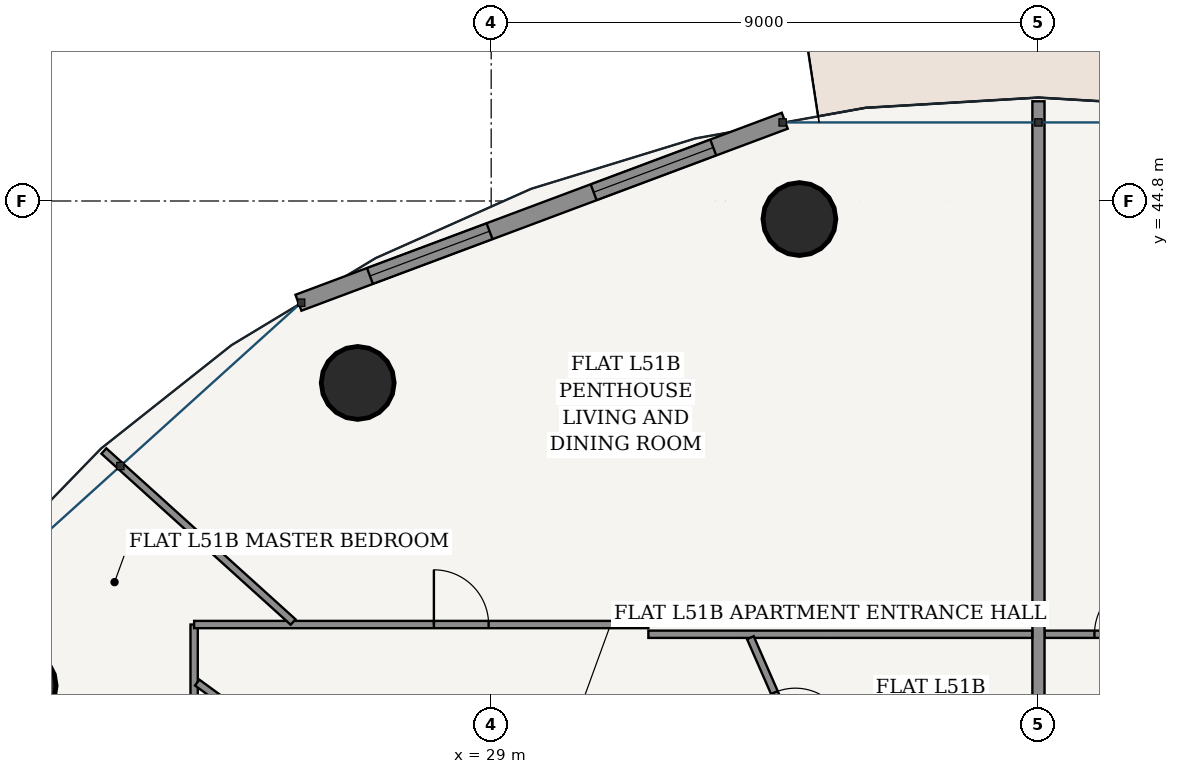
"""IFC4 building model, lengths in metres.
Left out: names, types, materials, properties, quantities, classifications, styles, units other than length and angle.
Written with IfcOpenShell. Run it as: python <this file> out.ifc"""

import sys

from ifc_helpers import new_model, si_unit, direction, frame, frame_2d, origin, origin_2d, place, context, subcontext, project, spatial, rectangle, hollow_circle, extrude, source, transform, mapped, element, fill, save


model = new_model("IFC4")
c1 = context("Model", 3, precision=1e-05, world=origin(), true_north=direction((-0.2419218956, 0.970295726276)))
c2 = subcontext(c1, "Body", "Model", "MODEL_VIEW")
j1 = project(units=[si_unit("LENGTHUNIT", "METRE"), si_unit("PLANEANGLEUNIT", "RADIAN")], contexts=[c1])
p1 = place(None, origin())
s1 = spatial("IfcSite", under=j1, at=p1, CompositionType="ELEMENT")
p2 = place(p1, origin())
s2 = spatial("IfcBuilding", under=s1, at=p2, CompositionType="ELEMENT")
p3 = place(p2, frame((0.0, 0.0, 194.9)))
s3 = spatial("IfcBuildingStorey", under=s2, at=p3, CompositionType="ELEMENT", Elevation=194.9)
for number, where, z_axis, x_axis in (
    (1, (34.069, 44.503, 0.0), (0.0, 0.0, 1.0), (1.0, 0.0, 0.0)),
    (2, (26.805, 41.808, 0.0), (0.0, 0.0, 1.0), (1.0, 0.0, 0.0)),
    (3, (21.246, 36.828, 0.0), (0.0, 0.0, 1.0), (1.0, 0.0, 0.0)),
):
    element("IfcColumn", number, at=place(p3, frame(where, z_axis=z_axis, x_axis=x_axis)), inside=s3, PredefinedType="COLUMN", context=c2, shape_type="SweptSolid", body=[
        extrude(hollow_circle(Radius=0.6, WallThickness=0.038, at=origin_2d()), origin(), (0.0, 0.0, 1.0), 3.7),
    ])
p4 = place(p3, frame((33.828, 46.12, 0.0), z_axis=(0.0, 0.0, 1.0), x_axis=(-0.936556918375, -0.350515532672, 0.0)))
e4 = element("IfcWall", 4, at=p4, inside=s3, PredefinedType="SOLIDWALL", context=c2, shape_type="SweptSolid", body=[
    extrude(rectangle(XDim=8.539, YDim=0.28, at=frame_2d((4.27, 0.0))), origin(), (0.0, 0.0, 1.0), 3.435),
])
p5 = place(p4, frame((1.256, 0.0, 0.85)))
e5 = element("IfcOpeningElement", 5, at=p5, cuts=e4, PredefinedType="OPENING", context=c2, shape_type="SweptSolid", body=[
    extrude(rectangle(XDim=2.1, YDim=1.95, at=frame_2d((1.05, 0.975))), frame((0.0, 0.15, 0.0), z_axis=(0.0, -1.0, 0.0), x_axis=(1.0, 0.0, 0.0)), (0.0, 0.0, 1.0), 0.3),
])
p6 = place(p4, frame((5.184, 0.0, 0.85)))
e6 = element("IfcOpeningElement", 6, at=p6, cuts=e4, PredefinedType="OPENING", context=c2, shape_type="SweptSolid", body=[
    extrude(rectangle(XDim=2.1, YDim=1.95, at=frame_2d((1.05, 0.975))), frame((0.0, 0.15, 0.0), z_axis=(0.0, -1.0, 0.0), x_axis=(1.0, 0.0, 0.0)), (0.0, 0.0, 1.0), 0.3),
])
p7 = place(p3, frame((38.102, 37.675, 0.0), z_axis=(0.0, 0.0, 1.0), x_axis=(1.0, 0.0, 0.0)))
e7 = element("IfcWall", 7, at=p7, inside=s3, PredefinedType="PARTITIONING", context=c2, shape_type="SweptSolid", body=[
    extrude(rectangle(XDim=6.313, YDim=0.12, at=frame_2d((3.156, 0.0))), origin(), (0.0, 0.0, 1.0), 2.951),
])
p8 = place(p7, frame((0.819, 0.0, 0.0)))
e8 = element("IfcOpeningElement", 8, at=p8, cuts=e7, PredefinedType="OPENING", context=c2, shape_type="SweptSolid", body=[
    extrude(rectangle(XDim=0.9, YDim=2.15, at=frame_2d((0.45, 1.075))), frame((0.0, 0.07, 0.0), z_axis=(0.0, -1.0, 0.0), x_axis=(1.0, 0.0, 0.0)), (0.0, 0.0, 1.0), 0.14),
])
p9 = place(p3, frame((38.0, 35.027, 0.0), z_axis=(0.0, 0.0, 1.0), x_axis=(0.0, 1.0, 0.0)))
e9 = element("IfcWall", 9, at=p9, inside=s3, PredefinedType="PARTITIONING", context=c2, shape_type="SweptSolid", body=[
    extrude(rectangle(XDim=11.413, YDim=0.2, at=frame_2d((5.707, 0.0))), origin(), (0.0, 0.0, 1.0), 2.52),
])
p10 = place(p3, frame((24.115, 24.406, 0.0), z_axis=(0.0, 0.0, 1.0), x_axis=(0.0, 1.0, 0.0)))
e10 = element("IfcWall", 10, at=p10, inside=s3, PredefinedType="PARTITIONING", context=c2, shape_type="SweptSolid", body=[
    extrude(rectangle(XDim=13.429, YDim=0.12, at=frame_2d((6.714, 0.0))), origin(), (0.0, 0.0, 1.0), 2.951),
])
p11 = place(p10, frame((9.641, 0.0, 0.0)))
e11 = element("IfcOpeningElement", 11, at=p11, cuts=e10, PredefinedType="OPENING", context=c2, shape_type="SweptSolid", body=[
    extrude(rectangle(XDim=0.9, YDim=2.15, at=frame_2d((0.45, 1.075))), frame((0.0, 0.07, 0.0), z_axis=(0.0, -1.0, 0.0), x_axis=(1.0, 0.0, 0.0)), (0.0, 0.0, 1.0), 0.14),
])
p12 = place(p3, frame((24.115, 37.835, 0.0), z_axis=(0.0, 0.0, 1.0), x_axis=(1.0, 0.0, 0.0)))
e12 = element("IfcWall", 12, at=p12, inside=s3, PredefinedType="PARTITIONING", context=c2, shape_type="SweptSolid", body=[
    extrude(rectangle(XDim=7.47, YDim=0.12, at=frame_2d((3.735, 0.0))), origin(), (0.0, 0.0, 1.0), 2.951),
])
p13 = place(p12, frame((3.943, 0.0, 0.0)))
e13 = element("IfcOpeningElement", 13, at=p13, cuts=e12, PredefinedType="OPENING", context=c2, shape_type="SweptSolid", body=[
    extrude(rectangle(XDim=0.9, YDim=2.15, at=frame_2d((0.45, 1.075))), frame((0.0, 0.07, 0.0), z_axis=(0.0, -1.0, 0.0), x_axis=(1.0, 0.0, 0.0)), (0.0, 0.0, 1.0), 0.14),
])
p14 = place(p3, frame((31.585, 37.675, 0.0), z_axis=(0.0, 0.0, 1.0), x_axis=(1.0, 0.0, 0.0)))
e14 = element("IfcWall", 14, at=p14, inside=s3, PredefinedType="PARTITIONING", context=c2, shape_type="SweptSolid", body=[
    extrude(rectangle(XDim=6.313, YDim=0.12, at=frame_2d((3.156, 0.0))), origin(), (0.0, 0.0, 1.0), 2.951),
])
p15 = place(p3, frame((25.743, 37.876, 0.0), z_axis=(0.0, 0.0, 1.0), x_axis=(-0.741943837234, 0.670462036502, 0.0)))
e15 = element("IfcWall", 15, at=p15, inside=s3, PredefinedType="PARTITIONING", context=c2, shape_type="SweptSolid", body=[
    extrude(rectangle(XDim=4.194, YDim=0.12, at=frame_2d((2.097, 0.0))), origin(), (0.0, 0.0, 1.0), 2.951),
])
p16 = place(p3, frame((34.397, 35.027, 0.0), z_axis=(0.0, 0.0, 1.0), x_axis=(-0.401135725485, 0.916018629581, 0.0)))
e16 = element("IfcWall", 16, at=p16, inside=s3, PredefinedType="PARTITIONING", context=c2, shape_type="SweptSolid", body=[
    extrude(rectangle(XDim=2.829, YDim=0.12, at=frame_2d((1.415, 0.0))), origin(), (0.0, 0.0, 1.0), 3.435),
])
p17 = place(p16, frame((0.985, 0.0, 0.0)))
e17 = element("IfcOpeningElement", 17, at=p17, cuts=e16, PredefinedType="OPENING", context=c2, shape_type="SweptSolid", body=[
    extrude(rectangle(XDim=0.86, YDim=2.15, at=frame_2d((0.43, 1.075))), frame((0.0, 0.07, 0.0), z_axis=(0.0, -1.0, 0.0), x_axis=(1.0, 0.0, 0.0)), (0.0, 0.0, 1.0), 0.14),
])
p18 = place(p3, frame((26.765, 34.986, 0.0), z_axis=(0.0, 0.0, 1.0), x_axis=(-0.808220499107, 0.588879974887, 0.0)))
e18 = element("IfcWall", 18, at=p18, inside=s3, PredefinedType="PARTITIONING", context=c2, shape_type="SweptSolid", body=[
    extrude(rectangle(XDim=3.217, YDim=0.12, at=frame_2d((1.608, 0.0))), origin(), (0.0, 0.0, 1.0), 3.11),
])
p19 = place(p18, frame((1.158, 0.0, 0.0)))
e19 = element("IfcOpeningElement", 19, at=p19, cuts=e18, PredefinedType="OPENING", context=c2, shape_type="SweptSolid", body=[
    extrude(rectangle(XDim=0.9, YDim=2.15, at=frame_2d((0.45, 1.075))), frame((0.0, 0.07, 0.0), z_axis=(0.0, -1.0, 0.0), x_axis=(1.0, 0.0, 0.0)), (0.0, 0.0, 1.0), 0.14),
])
m1 = source(origin(), c2, "Body", "SweptSolid", [
    extrude(rectangle(XDim=2.1, YDim=1.95, at=frame_2d((1.05, 0.975))), frame((0.0, 0.03, 0.0), z_axis=(0.0, -1.0, 0.0), x_axis=(1.0, 0.0, 0.0)), (0.0, 0.0, 1.0), 0.06),
])
p20 = place(p5, origin())
e20 = element("IfcWindow", 20, at=p20, inside=s3, PartitioningType="SINGLE_PANEL", PredefinedType="WINDOW", context=c2, shape_type="MappedRepresentation", body=[
    mapped(m1, transform((0.0, 0.0, 0.0), scale=1.0)),
])
fill(e5, e20)
p21 = place(p6, origin())
e21 = element("IfcWindow", 21, at=p21, inside=s3, PartitioningType="SINGLE_PANEL", PredefinedType="WINDOW", context=c2, shape_type="MappedRepresentation", body=[
    mapped(m1, transform((0.0, 0.0, 0.0), scale=1.0)),
])
fill(e6, e21)
m2 = source(origin(), c2, "Body", "SweptSolid", [
    extrude(rectangle(XDim=0.9, YDim=2.15, at=frame_2d((0.45, 1.075))), frame((0.0, 0.025, 0.0), z_axis=(0.0, -1.0, 0.0), x_axis=(1.0, 0.0, 0.0)), (0.0, 0.0, 1.0), 0.05),
])
p22 = place(p8, origin())
e22 = element("IfcDoor", 22, at=p22, inside=s3, OperationType="SINGLE_SWING_RIGHT", PredefinedType="DOOR", context=c2, shape_type="MappedRepresentation", body=[
    mapped(m2, transform((0.0, 0.0, 0.0), scale=1.0)),
])
fill(e8, e22)
m3 = source(origin(), c2, "Body", "SweptSolid", [
    extrude(rectangle(XDim=0.86, YDim=2.15, at=frame_2d((0.43, 1.075))), frame((0.0, 0.025, 0.0), z_axis=(0.0, -1.0, 0.0), x_axis=(1.0, 0.0, 0.0)), (0.0, 0.0, 1.0), 0.05),
])
p23 = place(p17, frame((0.86, 0.0, 0.0), z_axis=(0.0, 0.0, 1.0), x_axis=(-1.0, 0.0, 0.0)))
e23 = element("IfcDoor", 23, at=p23, inside=s3, OperationType="SINGLE_SWING_RIGHT", PredefinedType="DOOR", context=c2, shape_type="MappedRepresentation", body=[
    mapped(m3, transform((0.0, 0.0, 0.0), scale=1.0)),
])
fill(e17, e23)
p24 = place(p13, origin())
e24 = element("IfcDoor", 24, at=p24, inside=s3, OperationType="SINGLE_SWING_LEFT", PredefinedType="DOOR", context=c2, shape_type="MappedRepresentation", body=[
    mapped(m2, transform((0.0, 0.0, 0.0), scale=1.0)),
])
fill(e13, e24)
save(model, sys.argv[1])
